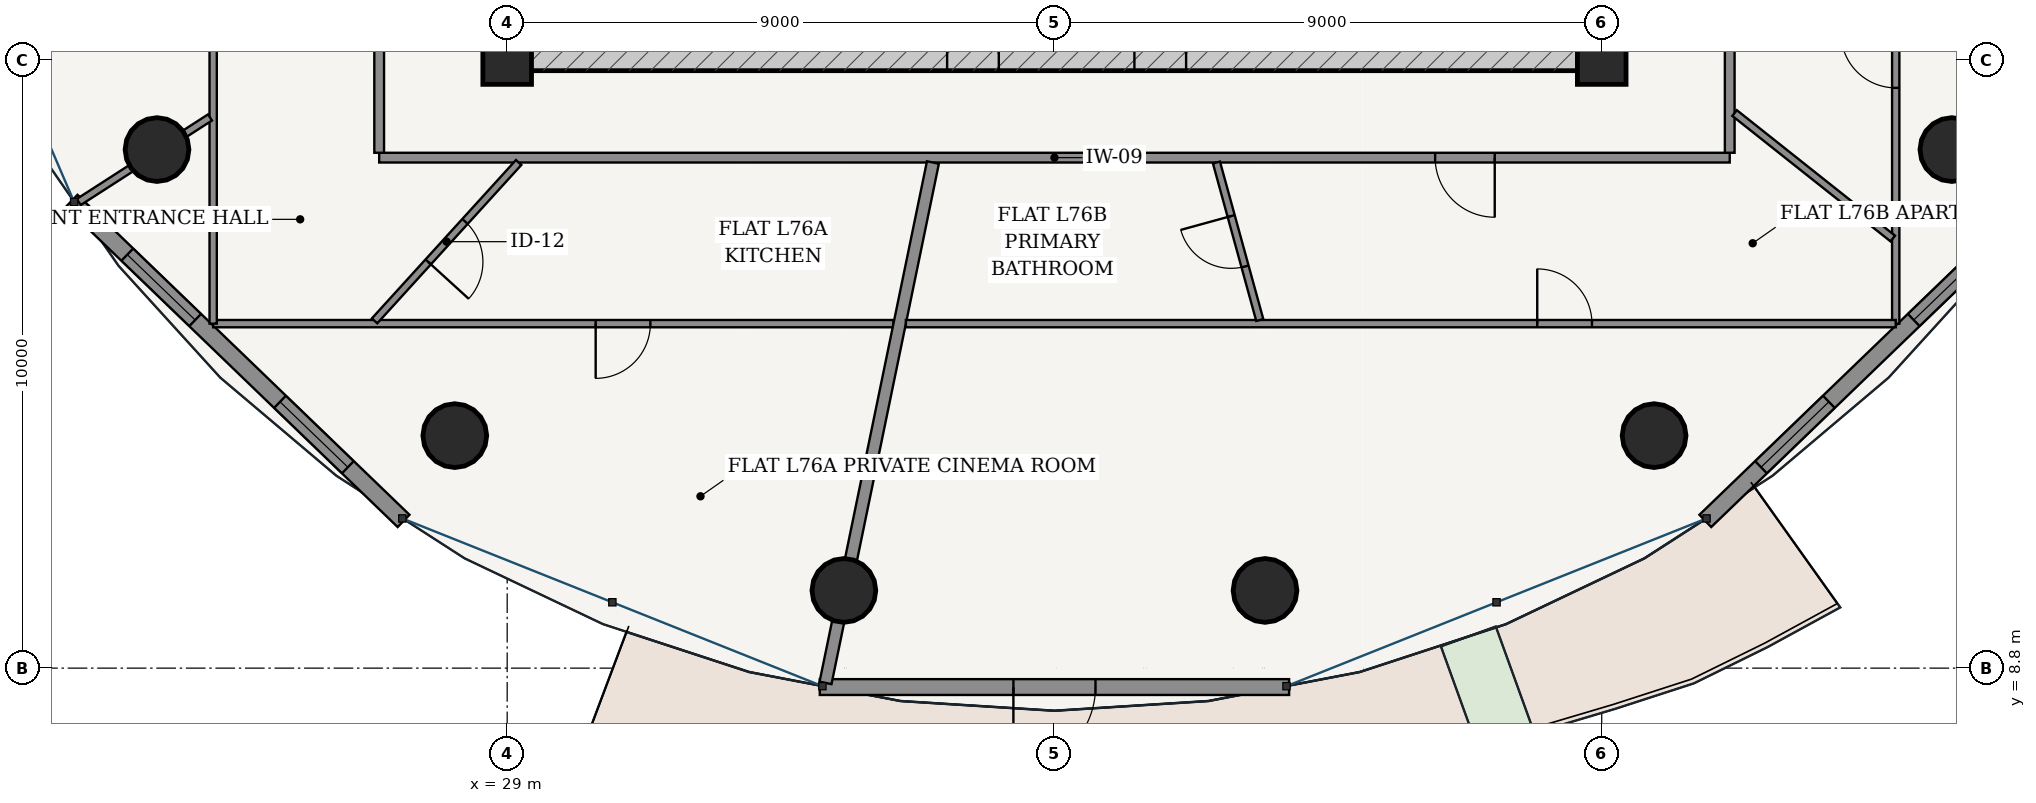
"""IFC4 building model, lengths in metres.
Left out: names, types, materials, properties, quantities, classifications, styles, units other than length and angle.
Written with IfcOpenShell. Run it as: python <this file> out.ifc"""

import sys

from ifc_helpers import new_model, si_unit, direction, frame, frame_2d, origin, origin_2d, place, context, subcontext, project, spatial, rectangle, hollow_circle, extrude, source, transform, mapped, element, fill, save


model = new_model("IFC4")
c1 = context("Model", 3, precision=1e-05, world=origin(), true_north=direction((-0.2419218956, 0.970295726276)))
c2 = subcontext(c1, "Body", "Model", "MODEL_VIEW")
j1 = project(units=[si_unit("LENGTHUNIT", "METRE"), si_unit("PLANEANGLEUNIT", "RADIAN")], contexts=[c1])
p1 = place(None, origin())
s1 = spatial("IfcSite", under=j1, at=p1, CompositionType="ELEMENT")
p2 = place(p1, origin())
s2 = spatial("IfcBuilding", under=s1, at=p2, CompositionType="ELEMENT")
p3 = place(p2, frame((0.0, 0.0, 289.45)))
s3 = spatial("IfcBuildingStorey", under=s2, at=p3, CompositionType="ELEMENT", Elevation=289.45)
for number, where, z_axis, x_axis in (
    (1, (29.0, 18.8, 0.0), (0.0, 0.0, 1.0), (1.0, 0.0, 0.0)),
    (2, (47.0, 18.8, 0.0), (0.0, 0.0, 1.0), (1.0, 0.0, 0.0)),
):
    element("IfcColumn", number, at=place(p3, frame(where, z_axis=z_axis, x_axis=x_axis)), inside=s3, PredefinedType="COLUMN", context=c2, shape_type="SweptSolid", body=[
        extrude(rectangle(XDim=0.8, YDim=0.8, at=origin_2d()), origin(), (0.0, 0.0, 1.0), 3.75),
    ])
p4 = place(p3, frame((28.825, 18.9, 0.0), z_axis=(0.0, 0.0, 1.0), x_axis=(1.0, 0.0, 0.0)))
e3 = element("IfcWall", 3, at=p4, inside=s3, PredefinedType="SHEAR", context=c2, shape_type="SweptSolid", body=[
    extrude(rectangle(XDim=18.35, YDim=0.55, at=frame_2d((9.175, 0.0))), origin(), (0.0, 0.0, 1.0), 3.49),
])
p5 = place(p4, frame((7.41, 0.0, 0.0)))
e4 = element("IfcOpeningElement", 4, at=p5, cuts=e3, PredefinedType="OPENING", context=c2, shape_type="SweptSolid", body=[
    extrude(rectangle(XDim=0.85, YDim=2.1, at=frame_2d((0.425, 1.05))), frame((0.0, 0.285, 0.0), z_axis=(0.0, -1.0, 0.0), x_axis=(1.0, 0.0, 0.0)), (0.0, 0.0, 1.0), 0.57),
])
p6 = place(p4, frame((10.49, 0.0, 0.0)))
e5 = element("IfcOpeningElement", 5, at=p6, cuts=e3, PredefinedType="OPENING", context=c2, shape_type="SweptSolid", body=[
    extrude(rectangle(XDim=0.85, YDim=2.1, at=frame_2d((0.425, 1.05))), frame((0.0, 0.285, 0.0), z_axis=(0.0, -1.0, 0.0), x_axis=(1.0, 0.0, 0.0)), (0.0, 0.0, 1.0), 0.57),
])
for number, where, z_axis, x_axis in (
    (6, (23.241, 17.328, 0.0), (0.0, 0.0, 1.0), (1.0, 0.0, 0.0)),
    (7, (28.139, 12.624, 0.0), (0.0, 0.0, 1.0), (1.0, 0.0, 0.0)),
    (8, (34.537, 10.078, 0.0), (0.0, 0.0, 1.0), (1.0, 0.0, 0.0)),
    (9, (41.463, 10.078, 0.0), (0.0, 0.0, 1.0), (1.0, 0.0, 0.0)),
    (10, (47.861, 12.624, 0.0), (0.0, 0.0, 1.0), (1.0, 0.0, 0.0)),
    (11, (52.759, 17.328, 0.0), (0.0, 0.0, 1.0), (1.0, 0.0, 0.0)),
):
    element("IfcColumn", number, at=place(p3, frame(where, z_axis=z_axis, x_axis=x_axis)), inside=s3, PredefinedType="COLUMN", context=c2, shape_type="SweptSolid", body=[
        extrude(hollow_circle(Radius=0.525, WallThickness=0.035, at=origin_2d()), origin(), (0.0, 0.0, 1.0), 3.75),
    ])
p7 = place(p3, frame((21.837, 16.483, 0.0), z_axis=(0.0, 0.0, 1.0), x_axis=(0.719995397366, -0.69397883813, 0.0)))
e12 = element("IfcWall", 12, at=p7, inside=s3, PredefinedType="SOLIDWALL", context=c2, shape_type="SweptSolid", body=[
    extrude(rectangle(XDim=7.582, YDim=0.28, at=frame_2d((3.791, 0.0))), origin(), (0.0, 0.0, 1.0), 3.49),
])
p8 = place(p7, frame((1.272, 0.0, 0.85)))
e13 = element("IfcOpeningElement", 13, at=p8, cuts=e12, PredefinedType="OPENING", context=c2, shape_type="SweptSolid", body=[
    extrude(rectangle(XDim=1.55, YDim=1.95, at=frame_2d((0.775, 0.975))), frame((0.0, 0.15, 0.0), z_axis=(0.0, -1.0, 0.0), x_axis=(1.0, 0.0, 0.0)), (0.0, 0.0, 1.0), 0.3),
])
p9 = place(p7, frame((4.76, 0.0, 0.85)))
e14 = element("IfcOpeningElement", 14, at=p9, cuts=e12, PredefinedType="OPENING", context=c2, shape_type="SweptSolid", body=[
    extrude(rectangle(XDim=1.55, YDim=1.95, at=frame_2d((0.775, 0.975))), frame((0.0, 0.15, 0.0), z_axis=(0.0, -1.0, 0.0), x_axis=(1.0, 0.0, 0.0)), (0.0, 0.0, 1.0), 0.3),
])
p10 = place(p3, frame((34.141, 8.489, 0.0), z_axis=(0.0, 0.0, 1.0), x_axis=(1.0, 0.0, 0.0)))
e15 = element("IfcWall", 15, at=p10, inside=s3, PredefinedType="SOLIDWALL", context=c2, shape_type="SweptSolid", body=[
    extrude(rectangle(XDim=7.718, YDim=0.26, at=frame_2d((3.859, 0.0))), origin(), (0.0, 0.0, 1.0), 3.49),
])
p11 = place(p10, frame((3.184, 0.0, 0.0)))
e16 = element("IfcOpeningElement", 16, at=p11, cuts=e15, PredefinedType="OPENING", context=c2, shape_type="SweptSolid", body=[
    extrude(rectangle(XDim=1.35, YDim=2.2, at=frame_2d((0.675, 1.1))), frame((0.0, 0.14, 0.0), z_axis=(0.0, -1.0, 0.0), x_axis=(1.0, 0.0, 0.0)), (0.0, 0.0, 1.0), 0.28),
])
p12 = place(p3, frame((48.704, 11.221, 0.0), z_axis=(0.0, 0.0, 1.0), x_axis=(0.719995397366, 0.69397883813, 0.0)))
e17 = element("IfcWall", 17, at=p12, inside=s3, PredefinedType="SOLIDWALL", context=c2, shape_type="SweptSolid", body=[
    extrude(rectangle(XDim=7.582, YDim=0.28, at=frame_2d((3.791, 0.0))), origin(), (0.0, 0.0, 1.0), 3.49),
])
p13 = place(p12, frame((1.272, 0.0, 0.85)))
e18 = element("IfcOpeningElement", 18, at=p13, cuts=e17, PredefinedType="OPENING", context=c2, shape_type="SweptSolid", body=[
    extrude(rectangle(XDim=1.55, YDim=1.95, at=frame_2d((0.775, 0.975))), frame((0.0, 0.15, 0.0), z_axis=(0.0, -1.0, 0.0), x_axis=(1.0, 0.0, 0.0)), (0.0, 0.0, 1.0), 0.3),
])
p14 = place(p12, frame((4.76, 0.0, 0.85)))
e19 = element("IfcOpeningElement", 19, at=p14, cuts=e17, PredefinedType="OPENING", context=c2, shape_type="SweptSolid", body=[
    extrude(rectangle(XDim=1.55, YDim=1.95, at=frame_2d((0.775, 0.975))), frame((0.0, 0.15, 0.0), z_axis=(0.0, -1.0, 0.0), x_axis=(1.0, 0.0, 0.0)), (0.0, 0.0, 1.0), 0.3),
])
p15 = place(p3, frame((26.895, 17.195, 0.0), z_axis=(0.0, 0.0, 1.0), x_axis=(1.0, 0.0, 0.0)))
e20 = element("IfcWall", 20, at=p15, inside=s3, PredefinedType="PARTITIONING", context=c2, shape_type="SweptSolid", body=[
    extrude(rectangle(XDim=22.21, YDim=0.16, at=frame_2d((11.105, 0.0))), origin(), (0.0, 0.0, 1.0), 3.015),
])
p16 = place(p15, frame((17.365, 0.0, 0.0)))
e21 = element("IfcOpeningElement", 21, at=p16, cuts=e20, PredefinedType="OPENING", context=c2, shape_type="SweptSolid", body=[
    extrude(rectangle(XDim=0.98, YDim=2.2, at=frame_2d((0.49, 1.1))), frame((0.0, 0.09, 0.0), z_axis=(0.0, -1.0, 0.0), x_axis=(1.0, 0.0, 0.0)), (0.0, 0.0, 1.0), 0.18),
])
p17 = place(p3, frame((26.895, 17.275, 0.0), z_axis=(0.0, 0.0, 1.0), x_axis=(0.0, 1.0, 0.0)))
e22 = element("IfcWall", 22, at=p17, inside=s3, PredefinedType="PARTITIONING", context=c2, shape_type="SweptSolid", body=[
    extrude(rectangle(XDim=13.925, YDim=0.16, at=frame_2d((6.962, 0.0))), origin(), (0.0, 0.0, 1.0), 3.015),
])
p18 = place(p17, frame((2.321, 0.0, 0.0)))
e23 = element("IfcOpeningElement", 23, at=p18, cuts=e22, PredefinedType="OPENING", context=c2, shape_type="SweptSolid", body=[
    extrude(rectangle(XDim=0.98, YDim=2.2, at=frame_2d((0.49, 1.1))), frame((0.0, 0.09, 0.0), z_axis=(0.0, -1.0, 0.0), x_axis=(1.0, 0.0, 0.0)), (0.0, 0.0, 1.0), 0.18),
])
p19 = place(p3, frame((49.105, 17.275, 0.0), z_axis=(0.0, 0.0, 1.0), x_axis=(0.0, 1.0, 0.0)))
e24 = element("IfcWall", 24, at=p19, inside=s3, PredefinedType="PARTITIONING", context=c2, shape_type="SweptSolid", body=[
    extrude(rectangle(XDim=13.925, YDim=0.16, at=frame_2d((6.962, 0.0))), origin(), (0.0, 0.0, 1.0), 3.015),
])
p20 = place(p3, frame((35.353, 14.465, 0.0), z_axis=(0.0, 0.0, 1.0), x_axis=(-1.0, 0.0, 0.0)))
e25 = element("IfcWall", 25, at=p20, inside=s3, PredefinedType="PARTITIONING", context=c2, shape_type="SweptSolid", body=[
    extrude(rectangle(XDim=11.188, YDim=0.12, at=frame_2d((5.594, 0.0))), origin(), (0.0, 0.0, 1.0), 3.015),
])
p21 = place(p20, frame((3.997, 0.0, 0.0)))
e26 = element("IfcOpeningElement", 26, at=p21, cuts=e25, PredefinedType="OPENING", context=c2, shape_type="SweptSolid", body=[
    extrude(rectangle(XDim=0.9, YDim=2.15, at=frame_2d((0.45, 1.075))), frame((0.0, 0.07, 0.0), z_axis=(0.0, -1.0, 0.0), x_axis=(1.0, 0.0, 0.0)), (0.0, 0.0, 1.0), 0.14),
])
p22 = place(p3, frame((24.165, 14.465, 0.0), z_axis=(0.0, 0.0, 1.0), x_axis=(0.0, 1.0, 0.0)))
e27 = element("IfcWall", 27, at=p22, inside=s3, PredefinedType="PARTITIONING", context=c2, shape_type="SweptSolid", body=[
    extrude(rectangle(XDim=19.545, YDim=0.12, at=frame_2d((9.772, 0.0))), origin(), (0.0, 0.0, 1.0), 3.015),
])
p23 = place(p22, frame((4.875, 0.0, 0.0)))
e28 = element("IfcOpeningElement", 28, at=p23, cuts=e27, PredefinedType="OPENING", context=c2, shape_type="SweptSolid", body=[
    extrude(rectangle(XDim=0.9, YDim=2.15, at=frame_2d((0.45, 1.075))), frame((0.0, 0.07, 0.0), z_axis=(0.0, -1.0, 0.0), x_axis=(1.0, 0.0, 0.0)), (0.0, 0.0, 1.0), 0.14),
])
p24 = place(p22, frame((16.61, 0.0, 0.0)))
e29 = element("IfcOpeningElement", 29, at=p24, cuts=e27, PredefinedType="OPENING", context=c2, shape_type="SweptSolid", body=[
    extrude(rectangle(XDim=0.9, YDim=2.15, at=frame_2d((0.45, 1.075))), frame((0.0, 0.07, 0.0), z_axis=(0.0, -1.0, 0.0), x_axis=(1.0, 0.0, 0.0)), (0.0, 0.0, 1.0), 0.14),
])
p25 = place(p3, frame((24.113, 17.856, 0.0), z_axis=(0.0, 0.0, 1.0), x_axis=(-0.840708587197, -0.54148783127, 0.0)))
e30 = element("IfcWall", 30, at=p25, inside=s3, PredefinedType="PARTITIONING", context=c2, shape_type="SweptSolid", body=[
    extrude(rectangle(XDim=2.568, YDim=0.12, at=frame_2d((1.284, 0.0))), origin(), (0.0, 0.0, 1.0), 3.015),
])
p26 = place(p3, frame((29.188, 17.115, 0.0), z_axis=(0.0, 0.0, 1.0), x_axis=(-0.67292817107, -0.739707831904, 0.0)))
e31 = element("IfcWall", 31, at=p26, inside=s3, PredefinedType="PARTITIONING", context=c2, shape_type="SweptSolid", body=[
    extrude(rectangle(XDim=3.521, YDim=0.12, at=frame_2d((1.76, 0.0))), origin(), (0.0, 0.0, 1.0), 3.015),
])
p27 = place(p26, frame((1.31, 0.0, 0.0)))
e32 = element("IfcOpeningElement", 32, at=p27, cuts=e31, PredefinedType="OPENING", context=c2, shape_type="SweptSolid", body=[
    extrude(rectangle(XDim=0.9, YDim=2.15, at=frame_2d((0.45, 1.075))), frame((0.0, 0.07, 0.0), z_axis=(0.0, -1.0, 0.0), x_axis=(1.0, 0.0, 0.0)), (0.0, 0.0, 1.0), 0.14),
])
p28 = place(p3, frame((36.001, 17.115, 0.0), z_axis=(0.0, 0.0, 1.0), x_axis=(-0.202108543081, -0.979363128167, 0.0)))
e33 = element("IfcWall", 33, at=p28, inside=s3, PredefinedType="PARTITIONING", context=c2, shape_type="SweptSolid", body=[
    extrude(rectangle(XDim=8.739, YDim=0.2, at=frame_2d((4.369, 0.0))), origin(), (0.0, 0.0, 1.0), 3.015),
])
p29 = place(p3, frame((51.835, 34.01, 0.0), z_axis=(0.0, 0.0, 1.0), x_axis=(0.0, -1.0, 0.0)))
e34 = element("IfcWall", 34, at=p29, inside=s3, PredefinedType="PARTITIONING", context=c2, shape_type="SweptSolid", body=[
    extrude(rectangle(XDim=19.545, YDim=0.12, at=frame_2d((9.772, 0.0))), origin(), (0.0, 0.0, 1.0), 3.015),
])
p30 = place(p29, frame((14.768, 0.0, 0.0)))
e35 = element("IfcOpeningElement", 35, at=p30, cuts=e34, PredefinedType="OPENING", context=c2, shape_type="SweptSolid", body=[
    extrude(rectangle(XDim=0.9, YDim=2.15, at=frame_2d((0.45, 1.075))), frame((0.0, 0.07, 0.0), z_axis=(0.0, -1.0, 0.0), x_axis=(1.0, 0.0, 0.0)), (0.0, 0.0, 1.0), 0.14),
])
p31 = place(p29, frame((8.718, 0.0, 0.0)))
e36 = element("IfcOpeningElement", 36, at=p31, cuts=e34, PredefinedType="OPENING", context=c2, shape_type="SweptSolid", body=[
    extrude(rectangle(XDim=0.9, YDim=2.15, at=frame_2d((0.45, 1.075))), frame((0.0, 0.07, 0.0), z_axis=(0.0, -1.0, 0.0), x_axis=(1.0, 0.0, 0.0)), (0.0, 0.0, 1.0), 0.14),
])
p32 = place(p29, frame((4.14, 0.0, 0.0)))
e37 = element("IfcOpeningElement", 37, at=p32, cuts=e34, PredefinedType="OPENING", context=c2, shape_type="SweptSolid", body=[
    extrude(rectangle(XDim=0.9, YDim=2.15, at=frame_2d((0.45, 1.075))), frame((0.0, 0.07, 0.0), z_axis=(0.0, -1.0, 0.0), x_axis=(1.0, 0.0, 0.0)), (0.0, 0.0, 1.0), 0.14),
])
p33 = place(p3, frame((51.835, 14.465, 0.0), z_axis=(0.0, 0.0, 1.0), x_axis=(-1.0, 0.0, 0.0)))
e38 = element("IfcWall", 38, at=p33, inside=s3, PredefinedType="PARTITIONING", context=c2, shape_type="SweptSolid", body=[
    extrude(rectangle(XDim=16.278, YDim=0.12, at=frame_2d((8.139, 0.0))), origin(), (0.0, 0.0, 1.0), 3.015),
])
p34 = place(p33, frame((4.996, 0.0, 0.0)))
e39 = element("IfcOpeningElement", 39, at=p34, cuts=e38, PredefinedType="OPENING", context=c2, shape_type="SweptSolid", body=[
    extrude(rectangle(XDim=0.9, YDim=2.15, at=frame_2d((0.45, 1.075))), frame((0.0, 0.07, 0.0), z_axis=(0.0, -1.0, 0.0), x_axis=(1.0, 0.0, 0.0)), (0.0, 0.0, 1.0), 0.14),
])
p35 = place(p3, frame((40.664, 17.115, 0.0), z_axis=(0.0, 0.0, 1.0), x_axis=(0.265177604745, -0.964199584081, 0.0)))
e40 = element("IfcWall", 40, at=p35, inside=s3, PredefinedType="PARTITIONING", context=c2, shape_type="SweptSolid", body=[
    extrude(rectangle(XDim=2.687, YDim=0.12, at=frame_2d((1.343, 0.0))), origin(), (0.0, 0.0, 1.0), 3.209),
])
p36 = place(p35, frame((0.913, 0.0, 0.0)))
e41 = element("IfcOpeningElement", 41, at=p36, cuts=e40, PredefinedType="OPENING", context=c2, shape_type="SweptSolid", body=[
    extrude(rectangle(XDim=0.86, YDim=2.15, at=frame_2d((0.43, 1.075))), frame((0.0, 0.07, 0.0), z_axis=(0.0, -1.0, 0.0), x_axis=(1.0, 0.0, 0.0)), (0.0, 0.0, 1.0), 0.14),
])
p37 = place(p3, frame((49.185, 17.928, 0.0), z_axis=(0.0, 0.0, 1.0), x_axis=(0.78348039615, -0.621416501912, 0.0)))
e42 = element("IfcWall", 42, at=p37, inside=s3, PredefinedType="PARTITIONING", context=c2, shape_type="SweptSolid", body=[
    extrude(rectangle(XDim=3.32, YDim=0.12, at=frame_2d((1.66, 0.0))), origin(), (0.0, 0.0, 1.0), 3.121),
])
m1 = source(origin(), c2, "Body", "SweptSolid", [
    extrude(rectangle(XDim=1.55, YDim=1.95, at=frame_2d((0.775, 0.975))), frame((0.0, 0.03, 0.0), z_axis=(0.0, -1.0, 0.0), x_axis=(1.0, 0.0, 0.0)), (0.0, 0.0, 1.0), 0.06),
])
p38 = place(p8, origin())
e43 = element("IfcWindow", 43, at=p38, inside=s3, PartitioningType="SINGLE_PANEL", PredefinedType="WINDOW", context=c2, shape_type="MappedRepresentation", body=[
    mapped(m1, transform((0.0, 0.0, 0.0), scale=1.0)),
])
fill(e13, e43)
p39 = place(p9, origin())
e44 = element("IfcWindow", 44, at=p39, inside=s3, PartitioningType="SINGLE_PANEL", PredefinedType="WINDOW", context=c2, shape_type="MappedRepresentation", body=[
    mapped(m1, transform((0.0, 0.0, 0.0), scale=1.0)),
])
fill(e14, e44)
m2 = source(origin(), c2, "Body", "SweptSolid", [
    extrude(rectangle(XDim=1.35, YDim=2.2, at=frame_2d((0.675, 1.1))), frame((0.0, 0.025, 0.0), z_axis=(0.0, -1.0, 0.0), x_axis=(1.0, 0.0, 0.0)), (0.0, 0.0, 1.0), 0.05),
])
p40 = place(p11, frame((1.35, 0.0, 0.0), z_axis=(0.0, 0.0, 1.0), x_axis=(-1.0, 0.0, 0.0)))
e45 = element("IfcDoor", 45, at=p40, inside=s3, OperationType="SINGLE_SWING_RIGHT", PredefinedType="DOOR", context=c2, shape_type="MappedRepresentation", body=[
    mapped(m2, transform((0.0, 0.0, 0.0), scale=1.0)),
])
fill(e16, e45)
p41 = place(p13, origin())
e46 = element("IfcWindow", 46, at=p41, inside=s3, PartitioningType="SINGLE_PANEL", PredefinedType="WINDOW", context=c2, shape_type="MappedRepresentation", body=[
    mapped(m1, transform((0.0, 0.0, 0.0), scale=1.0)),
])
fill(e18, e46)
p42 = place(p14, origin())
e47 = element("IfcWindow", 47, at=p42, inside=s3, PartitioningType="SINGLE_PANEL", PredefinedType="WINDOW", context=c2, shape_type="MappedRepresentation", body=[
    mapped(m1, transform((0.0, 0.0, 0.0), scale=1.0)),
])
fill(e19, e47)
m3 = source(origin(), c2, "Body", "SweptSolid", [
    extrude(rectangle(XDim=0.85, YDim=2.1, at=frame_2d((0.425, 1.05))), frame((0.0, 0.025, 0.0), z_axis=(0.0, -1.0, 0.0), x_axis=(1.0, 0.0, 0.0)), (0.0, 0.0, 1.0), 0.05),
])
p43 = place(p5, origin())
e48 = element("IfcDoor", 48, at=p43, inside=s3, OperationType="SINGLE_SWING_RIGHT", PredefinedType="DOOR", context=c2, shape_type="MappedRepresentation", body=[
    mapped(m3, transform((0.0, 0.0, 0.0), scale=1.0)),
])
fill(e4, e48)
p44 = place(p6, origin())
e49 = element("IfcDoor", 49, at=p44, inside=s3, OperationType="SINGLE_SWING_RIGHT", PredefinedType="DOOR", context=c2, shape_type="MappedRepresentation", body=[
    mapped(m3, transform((0.0, 0.0, 0.0), scale=1.0)),
])
fill(e5, e49)
m4 = source(origin(), c2, "Body", "SweptSolid", [
    extrude(rectangle(XDim=0.9, YDim=2.15, at=frame_2d((0.45, 1.075))), frame((0.0, 0.025, 0.0), z_axis=(0.0, -1.0, 0.0), x_axis=(1.0, 0.0, 0.0)), (0.0, 0.0, 1.0), 0.05),
])
p45 = place(p27, origin())
e50 = element("IfcDoor", 50, at=p45, inside=s3, OperationType="SINGLE_SWING_RIGHT", PredefinedType="DOOR", context=c2, shape_type="MappedRepresentation", body=[
    mapped(m4, transform((0.0, 0.0, 0.0), scale=1.0)),
])
fill(e32, e50)
p46 = place(p21, origin())
e51 = element("IfcDoor", 51, at=p46, inside=s3, OperationType="SINGLE_SWING_RIGHT", PredefinedType="DOOR", context=c2, shape_type="MappedRepresentation", body=[
    mapped(m4, transform((0.0, 0.0, 0.0), scale=1.0)),
])
fill(e26, e51)
m5 = source(origin(), c2, "Body", "SweptSolid", [
    extrude(rectangle(XDim=0.98, YDim=2.2, at=frame_2d((0.49, 1.1))), frame((0.0, 0.025, 0.0), z_axis=(0.0, -1.0, 0.0), x_axis=(1.0, 0.0, 0.0)), (0.0, 0.0, 1.0), 0.05),
])
p47 = place(p16, frame((0.98, 0.0, 0.0), z_axis=(0.0, 0.0, 1.0), x_axis=(-1.0, 0.0, 0.0)))
e52 = element("IfcDoor", 52, at=p47, inside=s3, OperationType="SINGLE_SWING_LEFT", PredefinedType="DOOR", context=c2, shape_type="MappedRepresentation", body=[
    mapped(m5, transform((0.0, 0.0, 0.0), scale=1.0)),
])
fill(e21, e52)
m6 = source(origin(), c2, "Body", "SweptSolid", [
    extrude(rectangle(XDim=0.86, YDim=2.15, at=frame_2d((0.43, 1.075))), frame((0.0, 0.025, 0.0), z_axis=(0.0, -1.0, 0.0), x_axis=(1.0, 0.0, 0.0)), (0.0, 0.0, 1.0), 0.05),
])
p48 = place(p36, frame((0.86, 0.0, 0.0), z_axis=(0.0, 0.0, 1.0), x_axis=(-1.0, 0.0, 0.0)))
e53 = element("IfcDoor", 53, at=p48, inside=s3, OperationType="SINGLE_SWING_RIGHT", PredefinedType="DOOR", context=c2, shape_type="MappedRepresentation", body=[
    mapped(m6, transform((0.0, 0.0, 0.0), scale=1.0)),
])
fill(e41, e53)
p49 = place(p34, frame((0.9, 0.0, 0.0), z_axis=(0.0, 0.0, 1.0), x_axis=(-1.0, 0.0, 0.0)))
e54 = element("IfcDoor", 54, at=p49, inside=s3, OperationType="SINGLE_SWING_LEFT", PredefinedType="DOOR", context=c2, shape_type="MappedRepresentation", body=[
    mapped(m4, transform((0.0, 0.0, 0.0), scale=1.0)),
])
fill(e39, e54)
p50 = place(p30, frame((0.9, 0.0, 0.0), z_axis=(0.0, 0.0, 1.0), x_axis=(-1.0, 0.0, 0.0)))
e55 = element("IfcDoor", 55, at=p50, inside=s3, OperationType="SINGLE_SWING_RIGHT", PredefinedType="DOOR", context=c2, shape_type="MappedRepresentation", body=[
    mapped(m4, transform((0.0, 0.0, 0.0), scale=1.0)),
])
fill(e35, e55)
save(model, sys.argv[1])
